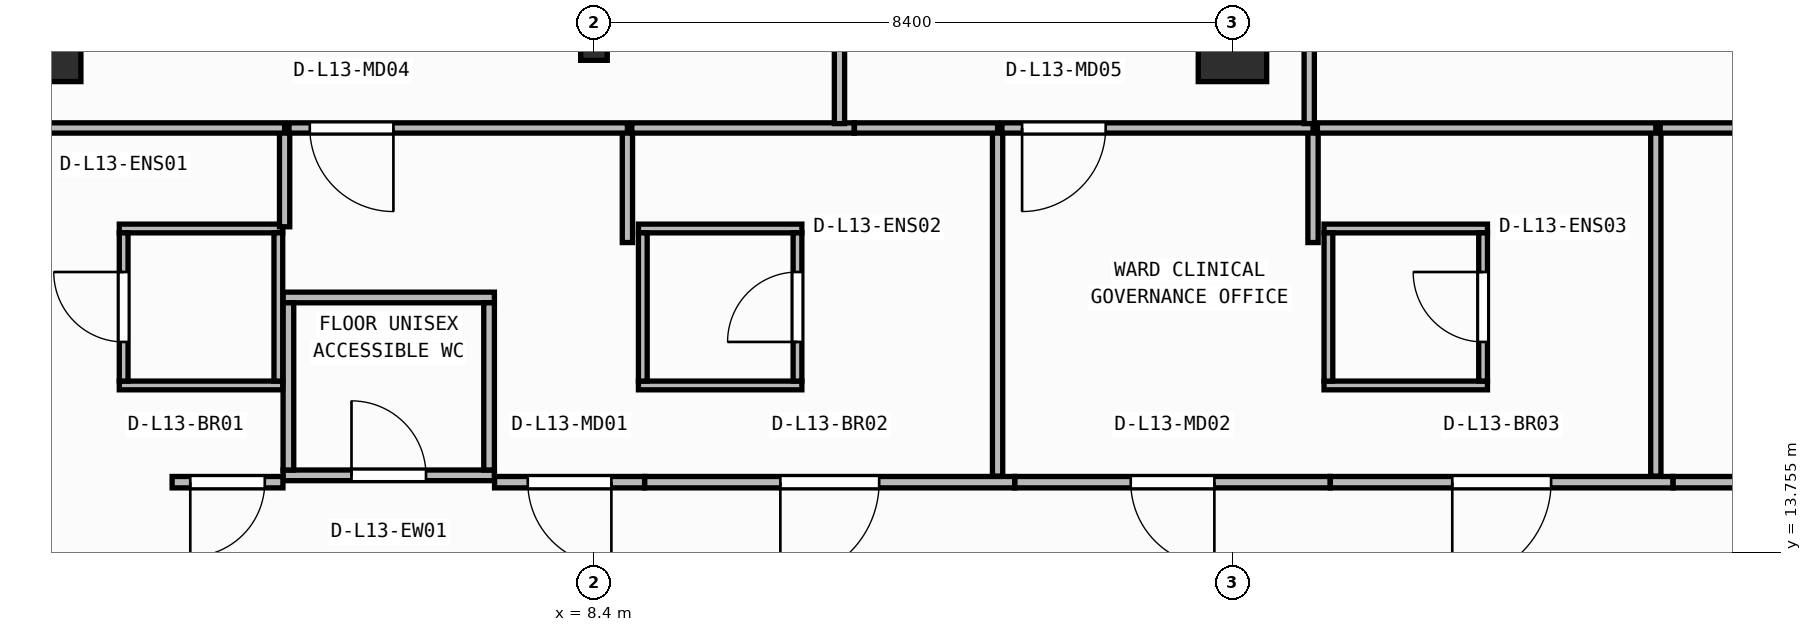
"""IFC4 building model, lengths in metres.
Left out: names, types, materials, properties, quantities, classifications, styles, units other than length and angle.
Written with IfcOpenShell. Run it as: python <this file> out.ifc"""

import sys

from ifc_helpers import new_model, si_unit, direction, frame, frame_2d, origin, origin_2d, place, context, subcontext, project, spatial, rectangle, i_section, extrude, element, fill, save


model = new_model("IFC4")
c1 = context("Model", 3, precision=1e-05, world=origin(), true_north=direction((0.0, 1.0)))
c2 = subcontext(c1, "Body", "Model", "MODEL_VIEW")
j1 = project(units=[si_unit("LENGTHUNIT", "METRE"), si_unit("PLANEANGLEUNIT", "RADIAN")], contexts=[c1])
p1 = place(None, origin())
s1 = spatial("IfcSite", under=j1, at=p1, CompositionType="ELEMENT")
p2 = place(p1, origin())
s2 = spatial("IfcBuilding", under=s1, at=p2, CompositionType="ELEMENT")
p3 = place(p2, frame((0.0, 0.0, 54.1)))
s3 = spatial("IfcBuildingStorey", under=s2, at=p3, CompositionType="ELEMENT", Elevation=54.1)
p4 = place(p3, frame((1.2, 20.4, 0.0), z_axis=(0.0, 0.0, 1.0), x_axis=(1.0, 0.0, 0.0)))
e1 = element("IfcColumn", 1, at=p4, inside=s3, PredefinedType="COLUMN", context=c2, shape_type="SweptSolid", body=[
    extrude(rectangle(XDim=0.9, YDim=0.9, at=origin_2d()), origin(), (0.0, 0.0, 1.0), 3.95),
])
p5 = place(p3, frame((8.4, 20.4, 0.0), z_axis=(0.0, 0.0, 1.0), x_axis=(1.0, 0.0, 0.0)))
e2 = element("IfcColumn", 2, at=p5, inside=s3, PredefinedType="COLUMN", context=c2, shape_type="SweptSolid", body=[
    extrude(i_section(OverallWidth=0.35, OverallDepth=0.34, WebThickness=0.016, FlangeThickness=0.028, at=origin_2d()), origin(), (0.0, 0.0, 1.0), 3.95),
])
p6 = place(p3, frame((16.8, 20.4, 0.0), z_axis=(0.0, 0.0, 1.0), x_axis=(1.0, 0.0, 0.0)))
e3 = element("IfcColumn", 3, at=p6, inside=s3, PredefinedType="COLUMN", context=c2, shape_type="SweptSolid", body=[
    extrude(rectangle(XDim=0.9, YDim=0.9, at=origin_2d()), origin(), (0.0, 0.0, 1.0), 3.95),
])
p7 = place(p3, frame((4.31, 14.77, 0.0), z_axis=(0.0, 0.0, 1.0), x_axis=(1.0, 0.0, 0.0)))
e4 = element("IfcWall", 4, at=p7, inside=s3, PredefinedType="PARTITIONING", context=c2, shape_type="SweptSolid", body=[
    extrude(rectangle(XDim=2.78, YDim=0.14, at=frame_2d((1.39, 0.0))), origin(), (0.0, 0.0, 1.0), 3.71),
])
p8 = place(p7, frame((0.9, 0.0, 0.0)))
e5 = element("IfcOpeningElement", 5, at=p8, cuts=e4, PredefinedType="OPENING", context=c2, shape_type="SweptSolid", body=[
    extrude(rectangle(XDim=0.98, YDim=2.1, at=frame_2d((0.49, 1.05))), frame((0.0, 0.08, 0.0), z_axis=(0.0, -1.0, 0.0), x_axis=(1.0, 0.0, 0.0)), (0.0, 0.0, 1.0), 0.16),
])
p9 = place(p3, frame((4.31, 17.11, 0.0), z_axis=(0.0, 0.0, 1.0), x_axis=(1.0, 0.0, 0.0)))
e6 = element("IfcWall", 6, at=p9, inside=s3, PredefinedType="PARTITIONING", context=c2, shape_type="SweptSolid", body=[
    extrude(rectangle(XDim=2.78, YDim=0.14, at=frame_2d((1.39, 0.0))), origin(), (0.0, 0.0, 1.0), 3.71),
])
for number, where, z_axis, x_axis in (
    (7, (4.38, 14.84, 0.0), (0.0, 0.0, 1.0), (0.0, 1.0, 0.0)),
    (8, (7.02, 14.84, 0.0), (0.0, 0.0, 1.0), (0.0, 1.0, 0.0)),
):
    element("IfcWall", number, at=place(p3, frame(where, z_axis=z_axis, x_axis=x_axis)), inside=s3, PredefinedType="PARTITIONING", context=c2, shape_type="SweptSolid", body=[
        extrude(rectangle(XDim=2.2, YDim=0.14, at=frame_2d((1.1, 0.0))), origin(), (0.0, 0.0, 1.0), 3.71),
    ])
for number, where, z_axis, x_axis in (
    (9, (2.155, 15.952, 0.0), (0.0, 0.0, 1.0), (1.0, 0.0, 0.0)),
    (10, (2.155, 18.018, 0.0), (0.0, 0.0, 1.0), (1.0, 0.0, 0.0)),
):
    element("IfcWall", number, at=place(p3, frame(where, z_axis=z_axis, x_axis=x_axis)), inside=s3, PredefinedType="PARTITIONING", context=c2, shape_type="SweptSolid", body=[
        extrude(rectangle(XDim=2.15, YDim=0.115, at=frame_2d((1.075, 0.0))), origin(), (0.0, 0.0, 1.0), 3.71),
    ])
p10 = place(p3, frame((2.212, 16.01, 0.0), z_axis=(0.0, 0.0, 1.0), x_axis=(0.0, 1.0, 0.0)))
e11 = element("IfcWall", 11, at=p10, inside=s3, PredefinedType="PARTITIONING", context=c2, shape_type="SweptSolid", body=[
    extrude(rectangle(XDim=1.95, YDim=0.115, at=frame_2d((0.975, 0.0))), origin(), (0.0, 0.0, 1.0), 3.71),
])
p11 = place(p10, frame((0.515, 0.0, 0.0)))
e12 = element("IfcOpeningElement", 12, at=p11, cuts=e11, PredefinedType="OPENING", context=c2, shape_type="SweptSolid", body=[
    extrude(rectangle(XDim=0.92, YDim=2.1, at=frame_2d((0.46, 1.05))), frame((0.0, 0.067, 0.0), z_axis=(0.0, -1.0, 0.0), x_axis=(1.0, 0.0, 0.0)), (0.0, 0.0, 1.0), 0.135),
])
p12 = place(p3, frame((4.248, 16.01, 0.0), z_axis=(0.0, 0.0, 1.0), x_axis=(0.0, 1.0, 0.0)))
e13 = element("IfcWall", 13, at=p12, inside=s3, PredefinedType="PARTITIONING", context=c2, shape_type="SweptSolid", body=[
    extrude(rectangle(XDim=1.95, YDim=0.115, at=frame_2d((0.975, 0.0))), origin(), (0.0, 0.0, 1.0), 3.71),
])
for number, where, z_axis, x_axis in (
    (14, (8.985, 15.952, 0.0), (0.0, 0.0, 1.0), (1.0, 0.0, 0.0)),
    (15, (8.985, 18.018, 0.0), (0.0, 0.0, 1.0), (1.0, 0.0, 0.0)),
):
    element("IfcWall", number, at=place(p3, frame(where, z_axis=z_axis, x_axis=x_axis)), inside=s3, PredefinedType="PARTITIONING", context=c2, shape_type="SweptSolid", body=[
        extrude(rectangle(XDim=2.15, YDim=0.115, at=frame_2d((1.075, 0.0))), origin(), (0.0, 0.0, 1.0), 3.71),
    ])
p13 = place(p3, frame((9.042, 16.01, 0.0), z_axis=(0.0, 0.0, 1.0), x_axis=(0.0, 1.0, 0.0)))
e16 = element("IfcWall", 16, at=p13, inside=s3, PredefinedType="PARTITIONING", context=c2, shape_type="SweptSolid", body=[
    extrude(rectangle(XDim=1.95, YDim=0.115, at=frame_2d((0.975, 0.0))), origin(), (0.0, 0.0, 1.0), 3.71),
])
p14 = place(p3, frame((11.077, 16.01, 0.0), z_axis=(0.0, 0.0, 1.0), x_axis=(0.0, 1.0, 0.0)))
e17 = element("IfcWall", 17, at=p14, inside=s3, PredefinedType="PARTITIONING", context=c2, shape_type="SweptSolid", body=[
    extrude(rectangle(XDim=1.95, YDim=0.115, at=frame_2d((0.975, 0.0))), origin(), (0.0, 0.0, 1.0), 3.71),
])
p15 = place(p14, frame((0.515, 0.0, 0.0)))
e18 = element("IfcOpeningElement", 18, at=p15, cuts=e17, PredefinedType="OPENING", context=c2, shape_type="SweptSolid", body=[
    extrude(rectangle(XDim=0.92, YDim=2.1, at=frame_2d((0.46, 1.05))), frame((0.0, 0.067, 0.0), z_axis=(0.0, -1.0, 0.0), x_axis=(1.0, 0.0, 0.0)), (0.0, 0.0, 1.0), 0.135),
])
for number, where, z_axis, x_axis in (
    (19, (18.005, 15.952, 0.0), (0.0, 0.0, 1.0), (1.0, 0.0, 0.0)),
    (20, (18.005, 18.018, 0.0), (0.0, 0.0, 1.0), (1.0, 0.0, 0.0)),
):
    element("IfcWall", number, at=place(p3, frame(where, z_axis=z_axis, x_axis=x_axis)), inside=s3, PredefinedType="PARTITIONING", context=c2, shape_type="SweptSolid", body=[
        extrude(rectangle(XDim=2.15, YDim=0.115, at=frame_2d((1.075, 0.0))), origin(), (0.0, 0.0, 1.0), 3.71),
    ])
p16 = place(p3, frame((18.062, 16.01, 0.0), z_axis=(0.0, 0.0, 1.0), x_axis=(0.0, 1.0, 0.0)))
e21 = element("IfcWall", 21, at=p16, inside=s3, PredefinedType="PARTITIONING", context=c2, shape_type="SweptSolid", body=[
    extrude(rectangle(XDim=1.95, YDim=0.115, at=frame_2d((0.975, 0.0))), origin(), (0.0, 0.0, 1.0), 3.71),
])
p17 = place(p3, frame((20.097, 16.01, 0.0), z_axis=(0.0, 0.0, 1.0), x_axis=(0.0, 1.0, 0.0)))
e22 = element("IfcWall", 22, at=p17, inside=s3, PredefinedType="PARTITIONING", context=c2, shape_type="SweptSolid", body=[
    extrude(rectangle(XDim=1.95, YDim=0.115, at=frame_2d((0.975, 0.0))), origin(), (0.0, 0.0, 1.0), 3.71),
])
p18 = place(p17, frame((0.515, 0.0, 0.0)))
e23 = element("IfcOpeningElement", 23, at=p18, cuts=e22, PredefinedType="OPENING", context=c2, shape_type="SweptSolid", body=[
    extrude(rectangle(XDim=0.92, YDim=2.1, at=frame_2d((0.46, 1.05))), frame((0.0, 0.067, 0.0), z_axis=(0.0, -1.0, 0.0), x_axis=(1.0, 0.0, 0.0)), (0.0, 0.0, 1.0), 0.135),
])
p19 = place(p3, frame((4.308, 14.68, 0.0), z_axis=(0.0, 0.0, 1.0), x_axis=(-1.0, 0.0, 0.0)))
e24 = element("IfcWall", 24, at=p19, inside=s3, PredefinedType="PARTITIONING", context=c2, shape_type="SweptSolid", body=[
    extrude(rectangle(XDim=1.458, YDim=0.15, at=frame_2d((0.729, 0.0))), origin(), (0.0, 0.0, 1.0), 3.71),
])
p20 = place(p19, frame((0.239, 0.0, 0.0)))
e25 = element("IfcOpeningElement", 25, at=p20, cuts=e24, PredefinedType="OPENING", context=c2, shape_type="SweptSolid", body=[
    extrude(rectangle(XDim=0.98, YDim=2.1, at=frame_2d((0.49, 1.05))), frame((0.0, 0.085, 0.0), z_axis=(0.0, -1.0, 0.0), x_axis=(1.0, 0.0, 0.0)), (0.0, 0.0, 1.0), 0.17),
])
p21 = place(p3, frame((9.066, 14.68, 0.0), z_axis=(0.0, 0.0, 1.0), x_axis=(-1.0, 0.0, 0.0)))
e26 = element("IfcWall", 26, at=p21, inside=s3, PredefinedType="PARTITIONING", context=c2, shape_type="SweptSolid", body=[
    extrude(rectangle(XDim=1.974, YDim=0.15, at=frame_2d((0.987, 0.0))), origin(), (0.0, 0.0, 1.0), 3.71),
])
p22 = place(p21, frame((0.437, 0.0, 0.0)))
e27 = element("IfcOpeningElement", 27, at=p22, cuts=e26, PredefinedType="OPENING", context=c2, shape_type="SweptSolid", body=[
    extrude(rectangle(XDim=1.1, YDim=2.1, at=frame_2d((0.55, 1.05))), frame((0.0, 0.085, 0.0), z_axis=(0.0, -1.0, 0.0), x_axis=(1.0, 0.0, 0.0)), (0.0, 0.0, 1.0), 0.17),
])
p23 = place(p3, frame((13.936, 14.68, 0.0), z_axis=(0.0, 0.0, 1.0), x_axis=(-1.0, 0.0, 0.0)))
e28 = element("IfcWall", 28, at=p23, inside=s3, PredefinedType="PARTITIONING", context=c2, shape_type="SweptSolid", body=[
    extrude(rectangle(XDim=4.868, YDim=0.15, at=frame_2d((2.434, 0.0))), origin(), (0.0, 0.0, 1.0), 3.71),
])
p24 = place(p23, frame((1.784, 0.0, 0.0)))
e29 = element("IfcOpeningElement", 29, at=p24, cuts=e28, PredefinedType="OPENING", context=c2, shape_type="SweptSolid", body=[
    extrude(rectangle(XDim=1.3, YDim=2.15, at=frame_2d((0.65, 1.075))), frame((0.0, 0.085, 0.0), z_axis=(0.0, -1.0, 0.0), x_axis=(1.0, 0.0, 0.0)), (0.0, 0.0, 1.0), 0.17),
])
p25 = place(p3, frame((18.086, 14.68, 0.0), z_axis=(0.0, 0.0, 1.0), x_axis=(-1.0, 0.0, 0.0)))
e30 = element("IfcWall", 30, at=p25, inside=s3, PredefinedType="PARTITIONING", context=c2, shape_type="SweptSolid", body=[
    extrude(rectangle(XDim=4.148, YDim=0.15, at=frame_2d((2.074, 0.0))), origin(), (0.0, 0.0, 1.0), 3.71),
])
p26 = place(p25, frame((1.524, 0.0, 0.0)))
e31 = element("IfcOpeningElement", 31, at=p26, cuts=e30, PredefinedType="OPENING", context=c2, shape_type="SweptSolid", body=[
    extrude(rectangle(XDim=1.1, YDim=2.1, at=frame_2d((0.55, 1.05))), frame((0.0, 0.085, 0.0), z_axis=(0.0, -1.0, 0.0), x_axis=(1.0, 0.0, 0.0)), (0.0, 0.0, 1.0), 0.17),
])
p27 = place(p3, frame((22.596, 14.68, 0.0), z_axis=(0.0, 0.0, 1.0), x_axis=(-1.0, 0.0, 0.0)))
e32 = element("IfcWall", 32, at=p27, inside=s3, PredefinedType="PARTITIONING", context=c2, shape_type="SweptSolid", body=[
    extrude(rectangle(XDim=4.508, YDim=0.15, at=frame_2d((2.254, 0.0))), origin(), (0.0, 0.0, 1.0), 3.71),
])
p28 = place(p27, frame((1.604, 0.0, 0.0)))
e33 = element("IfcOpeningElement", 33, at=p28, cuts=e32, PredefinedType="OPENING", context=c2, shape_type="SweptSolid", body=[
    extrude(rectangle(XDim=1.3, YDim=2.15, at=frame_2d((0.65, 1.075))), frame((0.0, 0.085, 0.0), z_axis=(0.0, -1.0, 0.0), x_axis=(1.0, 0.0, 0.0)), (0.0, 0.0, 1.0), 0.17),
])
p29 = place(p3, frame((27.546, 14.68, 0.0), z_axis=(0.0, 0.0, 1.0), x_axis=(-1.0, 0.0, 0.0)))
e34 = element("IfcWall", 34, at=p29, inside=s3, PredefinedType="PARTITIONING", context=c2, shape_type="SweptSolid", body=[
    extrude(rectangle(XDim=4.948, YDim=0.15, at=frame_2d((2.474, 0.0))), origin(), (0.0, 0.0, 1.0), 3.71),
])
p30 = place(p29, frame((1.924, 0.0, 0.0)))
e35 = element("IfcOpeningElement", 35, at=p30, cuts=e34, PredefinedType="OPENING", context=c2, shape_type="SweptSolid", body=[
    extrude(rectangle(XDim=1.1, YDim=2.1, at=frame_2d((0.55, 1.05))), frame((0.0, 0.085, 0.0), z_axis=(0.0, -1.0, 0.0), x_axis=(1.0, 0.0, 0.0)), (0.0, 0.0, 1.0), 0.17),
])
p31 = place(p3, frame((4.33, 18.04, 0.0), z_axis=(0.0, 0.0, 1.0), x_axis=(0.0, 1.0, 0.0)))
e36 = element("IfcWall", 36, at=p31, inside=s3, PredefinedType="PARTITIONING", context=c2, shape_type="SweptSolid", body=[
    extrude(rectangle(XDim=1.3, YDim=0.135, at=frame_2d((0.65, 0.0))), origin(), (0.0, 0.0, 1.0), 3.71),
])
p32 = place(p3, frame((4.33, 19.34, 0.0), z_axis=(0.0, 0.0, 1.0), x_axis=(-1.0, 0.0, 0.0)))
e37 = element("IfcWall", 37, at=p32, inside=s3, PredefinedType="PARTITIONING", context=c2, shape_type="SweptSolid", body=[
    extrude(rectangle(XDim=4.09, YDim=0.135, at=frame_2d((2.045, 0.0))), origin(), (0.0, 0.0, 1.0), 3.71),
])
p33 = place(p3, frame((8.84, 17.833, 0.0), z_axis=(0.0, 0.0, 1.0), x_axis=(0.0, 1.0, 0.0)))
e38 = element("IfcWall", 38, at=p33, inside=s3, PredefinedType="PARTITIONING", context=c2, shape_type="SweptSolid", body=[
    extrude(rectangle(XDim=1.508, YDim=0.135, at=frame_2d((0.754, 0.0))), origin(), (0.0, 0.0, 1.0), 3.71),
])
p34 = place(p3, frame((8.84, 19.34, 0.0), z_axis=(0.0, 0.0, 1.0), x_axis=(-1.0, 0.0, 0.0)))
e39 = element("IfcWall", 39, at=p34, inside=s3, PredefinedType="PARTITIONING", context=c2, shape_type="SweptSolid", body=[
    extrude(rectangle(XDim=4.453, YDim=0.135, at=frame_2d((2.226, 0.0))), origin(), (0.0, 0.0, 1.0), 3.71),
])
p35 = place(p34, frame((3.079, 0.0, 0.0)))
e40 = element("IfcOpeningElement", 40, at=p35, cuts=e39, PredefinedType="OPENING", context=c2, shape_type="SweptSolid", body=[
    extrude(rectangle(XDim=1.1, YDim=2.1, at=frame_2d((0.55, 1.05))), frame((0.0, 0.077, 0.0), z_axis=(0.0, -1.0, 0.0), x_axis=(1.0, 0.0, 0.0)), (0.0, 0.0, 1.0), 0.155),
])
p36 = place(p3, frame((13.71, 14.76, 0.0), z_axis=(0.0, 0.0, 1.0), x_axis=(0.0, 1.0, 0.0)))
e41 = element("IfcWall", 41, at=p36, inside=s3, PredefinedType="PARTITIONING", context=c2, shape_type="SweptSolid", body=[
    extrude(rectangle(XDim=4.58, YDim=0.135, at=frame_2d((2.29, 0.0))), origin(), (0.0, 0.0, 1.0), 3.71),
])
p37 = place(p3, frame((11.825, 19.34, 0.0), z_axis=(0.0, 0.0, 1.0), x_axis=(-1.0, 0.0, 0.0)))
e42 = element("IfcWall", 42, at=p37, inside=s3, PredefinedType="PARTITIONING", context=c2, shape_type="SweptSolid", body=[
    extrude(rectangle(XDim=2.927, YDim=0.135, at=frame_2d((1.464, 0.0))), origin(), (0.0, 0.0, 1.0), 3.71),
])
p38 = place(p3, frame((13.71, 19.34, 0.0), z_axis=(0.0, 0.0, 1.0), x_axis=(-1.0, 0.0, 0.0)))
e43 = element("IfcWall", 43, at=p38, inside=s3, PredefinedType="PARTITIONING", context=c2, shape_type="SweptSolid", body=[
    extrude(rectangle(XDim=1.883, YDim=0.135, at=frame_2d((0.942, 0.0))), origin(), (0.0, 0.0, 1.0), 3.71),
])
p39 = place(p3, frame((17.86, 17.833, 0.0), z_axis=(0.0, 0.0, 1.0), x_axis=(0.0, 1.0, 0.0)))
e44 = element("IfcWall", 44, at=p39, inside=s3, PredefinedType="PARTITIONING", context=c2, shape_type="SweptSolid", body=[
    extrude(rectangle(XDim=1.508, YDim=0.135, at=frame_2d((0.754, 0.0))), origin(), (0.0, 0.0, 1.0), 3.71),
])
p40 = place(p3, frame((17.86, 19.34, 0.0), z_axis=(0.0, 0.0, 1.0), x_axis=(-1.0, 0.0, 0.0)))
e45 = element("IfcWall", 45, at=p40, inside=s3, PredefinedType="PARTITIONING", context=c2, shape_type="SweptSolid", body=[
    extrude(rectangle(XDim=4.093, YDim=0.135, at=frame_2d((2.046, 0.0))), origin(), (0.0, 0.0, 1.0), 3.71),
])
p41 = place(p40, frame((2.728, 0.0, 0.0)))
e46 = element("IfcOpeningElement", 46, at=p41, cuts=e45, PredefinedType="OPENING", context=c2, shape_type="SweptSolid", body=[
    extrude(rectangle(XDim=1.1, YDim=2.1, at=frame_2d((0.55, 1.05))), frame((0.0, 0.077, 0.0), z_axis=(0.0, -1.0, 0.0), x_axis=(1.0, 0.0, 0.0)), (0.0, 0.0, 1.0), 0.155),
])
p42 = place(p3, frame((22.37, 14.76, 0.0), z_axis=(0.0, 0.0, 1.0), x_axis=(0.0, 1.0, 0.0)))
e47 = element("IfcWall", 47, at=p42, inside=s3, PredefinedType="PARTITIONING", context=c2, shape_type="SweptSolid", body=[
    extrude(rectangle(XDim=4.58, YDim=0.135, at=frame_2d((2.29, 0.0))), origin(), (0.0, 0.0, 1.0), 3.71),
])
p43 = place(p3, frame((22.37, 19.34, 0.0), z_axis=(0.0, 0.0, 1.0), x_axis=(-1.0, 0.0, 0.0)))
e48 = element("IfcWall", 48, at=p43, inside=s3, PredefinedType="PARTITIONING", context=c2, shape_type="SweptSolid", body=[
    extrude(rectangle(XDim=4.453, YDim=0.135, at=frame_2d((2.226, 0.0))), origin(), (0.0, 0.0, 1.0), 3.71),
])
p44 = place(p3, frame((27.32, 19.34, 0.0), z_axis=(0.0, 0.0, 1.0), x_axis=(-1.0, 0.0, 0.0)))
e49 = element("IfcWall", 49, at=p44, inside=s3, PredefinedType="PARTITIONING", context=c2, shape_type="SweptSolid", body=[
    extrude(rectangle(XDim=4.893, YDim=0.135, at=frame_2d((2.446, 0.0))), origin(), (0.0, 0.0, 1.0), 3.71),
])
for number, where, z_axis, x_axis in (
    (50, (11.63, 19.397, 0.0), (0.0, 0.0, 1.0), (0.0, 1.0, 0.0)),
    (51, (17.81, 19.397, 0.0), (0.0, 0.0, 1.0), (0.0, 1.0, 0.0)),
):
    element("IfcWall", number, at=place(p3, frame(where, z_axis=z_axis, x_axis=x_axis)), inside=s3, PredefinedType="PARTITIONING", context=c2, shape_type="SweptSolid", body=[
        extrude(rectangle(XDim=9.522, YDim=0.135, at=frame_2d((4.761, 0.0))), origin(), (0.0, 0.0, 1.0), 3.71),
    ])
p45 = place(p8, origin())
e52 = element("IfcDoor", 52, at=p45, inside=s3, OperationType="SINGLE_SWING_LEFT", PredefinedType="DOOR", context=c2, shape_type="SweptSolid", body=[
    extrude(rectangle(XDim=0.98, YDim=2.1, at=frame_2d((0.49, 1.05))), frame((0.0, 0.025, 0.0), z_axis=(0.0, -1.0, 0.0), x_axis=(1.0, 0.0, 0.0)), (0.0, 0.0, 1.0), 0.05),
])
fill(e5, e52)
p46 = place(p11, origin())
e53 = element("IfcDoor", 53, at=p46, inside=s3, OperationType="SINGLE_SWING_RIGHT", PredefinedType="DOOR", context=c2, shape_type="SweptSolid", body=[
    extrude(rectangle(XDim=0.92, YDim=2.1, at=frame_2d((0.46, 1.05))), frame((0.0, 0.025, 0.0), z_axis=(0.0, -1.0, 0.0), x_axis=(1.0, 0.0, 0.0)), (0.0, 0.0, 1.0), 0.05),
])
fill(e12, e53)
p47 = place(p15, origin())
e54 = element("IfcDoor", 54, at=p47, inside=s3, OperationType="SINGLE_SWING_LEFT", PredefinedType="DOOR", context=c2, shape_type="SweptSolid", body=[
    extrude(rectangle(XDim=0.92, YDim=2.1, at=frame_2d((0.46, 1.05))), frame((0.0, 0.025, 0.0), z_axis=(0.0, -1.0, 0.0), x_axis=(1.0, 0.0, 0.0)), (0.0, 0.0, 1.0), 0.05),
])
fill(e18, e54)
p48 = place(p18, origin())
e55 = element("IfcDoor", 55, at=p48, inside=s3, OperationType="SINGLE_SWING_RIGHT", PredefinedType="DOOR", context=c2, shape_type="SweptSolid", body=[
    extrude(rectangle(XDim=0.92, YDim=2.1, at=frame_2d((0.46, 1.05))), frame((0.0, 0.025, 0.0), z_axis=(0.0, -1.0, 0.0), x_axis=(1.0, 0.0, 0.0)), (0.0, 0.0, 1.0), 0.05),
])
fill(e23, e55)
p49 = place(p20, origin())
e56 = element("IfcDoor", 56, at=p49, inside=s3, OperationType="SINGLE_SWING_RIGHT", PredefinedType="DOOR", context=c2, shape_type="SweptSolid", body=[
    extrude(rectangle(XDim=0.98, YDim=2.1, at=frame_2d((0.49, 1.05))), frame((0.0, 0.025, 0.0), z_axis=(0.0, -1.0, 0.0), x_axis=(1.0, 0.0, 0.0)), (0.0, 0.0, 1.0), 0.05),
])
fill(e25, e56)
p50 = place(p22, origin())
e57 = element("IfcDoor", 57, at=p50, inside=s3, OperationType="SINGLE_SWING_LEFT", PredefinedType="DOOR", context=c2, shape_type="SweptSolid", body=[
    extrude(rectangle(XDim=1.1, YDim=2.1, at=frame_2d((0.55, 1.05))), frame((0.0, 0.025, 0.0), z_axis=(0.0, -1.0, 0.0), x_axis=(1.0, 0.0, 0.0)), (0.0, 0.0, 1.0), 0.05),
])
fill(e27, e57)
p51 = place(p24, origin())
e58 = element("IfcDoor", 58, at=p51, inside=s3, OperationType="SINGLE_SWING_RIGHT", PredefinedType="DOOR", context=c2, shape_type="SweptSolid", body=[
    extrude(rectangle(XDim=1.3, YDim=2.15, at=frame_2d((0.65, 1.075))), frame((0.0, 0.025, 0.0), z_axis=(0.0, -1.0, 0.0), x_axis=(1.0, 0.0, 0.0)), (0.0, 0.0, 1.0), 0.05),
])
fill(e29, e58)
p52 = place(p26, origin())
e59 = element("IfcDoor", 59, at=p52, inside=s3, OperationType="SINGLE_SWING_LEFT", PredefinedType="DOOR", context=c2, shape_type="SweptSolid", body=[
    extrude(rectangle(XDim=1.1, YDim=2.1, at=frame_2d((0.55, 1.05))), frame((0.0, 0.025, 0.0), z_axis=(0.0, -1.0, 0.0), x_axis=(1.0, 0.0, 0.0)), (0.0, 0.0, 1.0), 0.05),
])
fill(e31, e59)
p53 = place(p28, origin())
e60 = element("IfcDoor", 60, at=p53, inside=s3, OperationType="SINGLE_SWING_RIGHT", PredefinedType="DOOR", context=c2, shape_type="SweptSolid", body=[
    extrude(rectangle(XDim=1.3, YDim=2.15, at=frame_2d((0.65, 1.075))), frame((0.0, 0.025, 0.0), z_axis=(0.0, -1.0, 0.0), x_axis=(1.0, 0.0, 0.0)), (0.0, 0.0, 1.0), 0.05),
])
fill(e33, e60)
p54 = place(p35, origin())
e61 = element("IfcDoor", 61, at=p54, inside=s3, OperationType="SINGLE_SWING_LEFT", PredefinedType="DOOR", context=c2, shape_type="SweptSolid", body=[
    extrude(rectangle(XDim=1.1, YDim=2.1, at=frame_2d((0.55, 1.05))), frame((0.0, 0.025, 0.0), z_axis=(0.0, -1.0, 0.0), x_axis=(1.0, 0.0, 0.0)), (0.0, 0.0, 1.0), 0.05),
])
fill(e40, e61)
p55 = place(p41, origin())
e62 = element("IfcDoor", 62, at=p55, inside=s3, OperationType="SINGLE_SWING_RIGHT", PredefinedType="DOOR", context=c2, shape_type="SweptSolid", body=[
    extrude(rectangle(XDim=1.1, YDim=2.1, at=frame_2d((0.55, 1.05))), frame((0.0, 0.025, 0.0), z_axis=(0.0, -1.0, 0.0), x_axis=(1.0, 0.0, 0.0)), (0.0, 0.0, 1.0), 0.05),
])
fill(e46, e62)
save(model, sys.argv[1])
